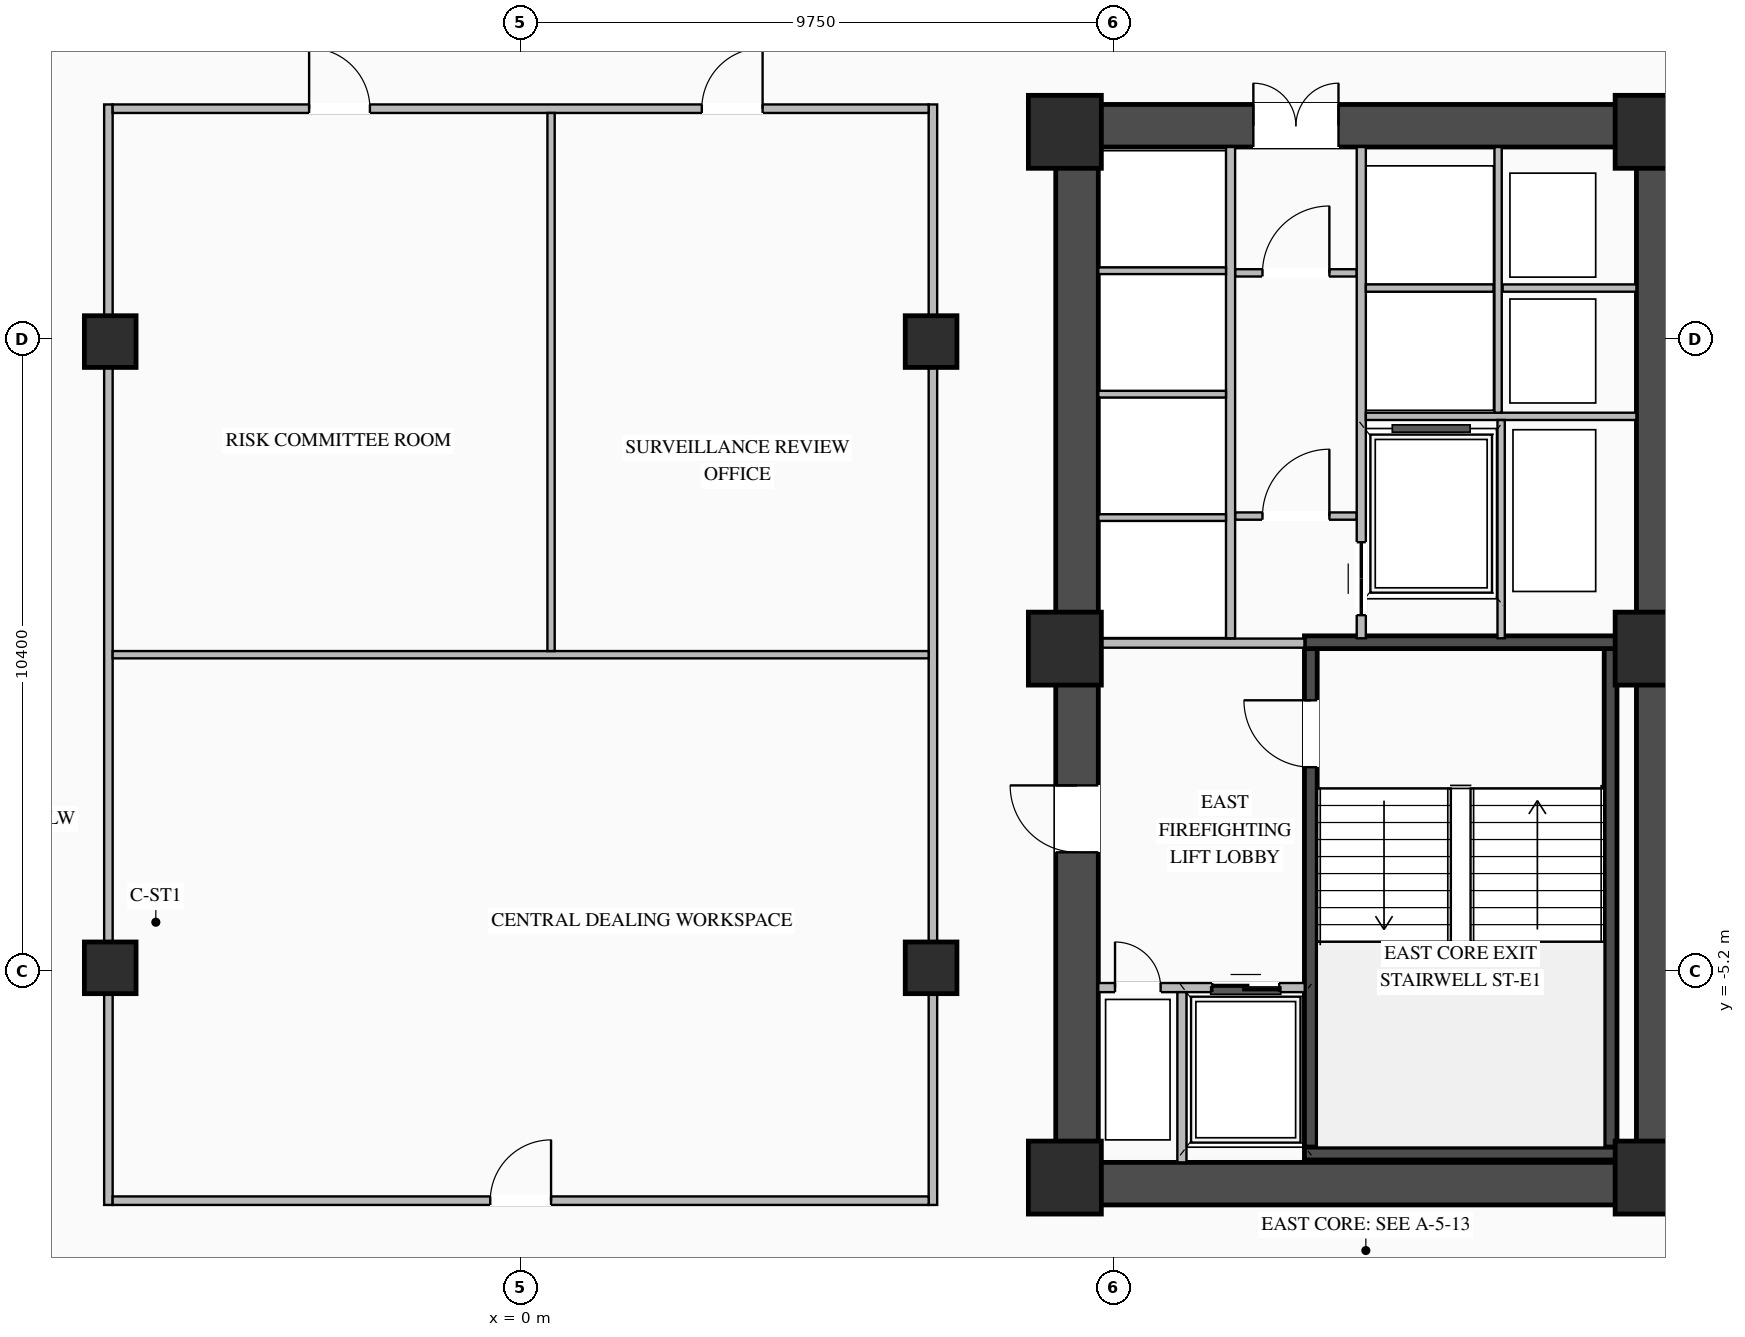
"""IFC4 building model, lengths in metres.
Left out: names, types, materials, properties, quantities, classifications, styles, units other than length and angle.
Written with IfcOpenShell. Run it as: python <this file> out.ifc"""

import sys

from ifc_helpers import new_model, si_unit, direction, frame, frame_2d, origin, origin_2d, place, context, subcontext, project, spatial, rectangle, i_section, extrude, element, fill, save


model = new_model("IFC4")
c1 = context("Model", 3, precision=1e-05, world=origin(), true_north=direction((0.0, 1.0)))
c2 = subcontext(c1, "Body", "Model", "MODEL_VIEW")
j1 = project(units=[si_unit("LENGTHUNIT", "METRE"), si_unit("PLANEANGLEUNIT", "RADIAN")], contexts=[c1])
p1 = place(None, origin())
s1 = spatial("IfcSite", under=j1, at=p1, CompositionType="ELEMENT")
p2 = place(p1, origin())
s2 = spatial("IfcBuilding", under=s1, at=p2, CompositionType="ELEMENT")
p3 = place(p2, frame((0.0, 0.0, 51.9)))
s3 = spatial("IfcBuildingStorey", under=s2, at=p3, CompositionType="ELEMENT", Elevation=51.9)
p4 = place(p3, frame((8.8, -8.7, 0.0), z_axis=(0.0, 0.0, 1.0), x_axis=(1.0, 0.0, 0.0)))
e1 = element("IfcWall", 1, at=p4, inside=s3, PredefinedType="SHEAR", context=c2, shape_type="SweptSolid", body=[
    extrude(rectangle(XDim=10.25, YDim=0.7, at=frame_2d((5.125, 0.0))), origin(), (0.0, 0.0, 1.0), 3.27),
])
p5 = place(p3, frame((8.8, 8.7, 0.0), z_axis=(0.0, 0.0, 1.0), x_axis=(1.0, 0.0, 0.0)))
e2 = element("IfcWall", 2, at=p5, inside=s3, PredefinedType="SHEAR", context=c2, shape_type="SweptSolid", body=[
    extrude(rectangle(XDim=10.25, YDim=0.7, at=frame_2d((5.125, 0.0))), origin(), (0.0, 0.0, 1.0), 3.27),
])
p6 = place(p5, frame((3.25, 0.0, 0.0)))
e3 = element("IfcOpeningElement", 3, at=p6, cuts=e2, PredefinedType="OPENING", context=c2, shape_type="SweptSolid", body=[
    extrude(rectangle(XDim=1.4, YDim=2.05, at=frame_2d((0.7, 1.025))), frame((0.0, 0.36, 0.0), z_axis=(0.0, -1.0, 0.0), x_axis=(1.0, 0.0, 0.0)), (0.0, 0.0, 1.0), 0.72),
])
p7 = place(p3, frame((9.15, -8.35, 0.0), z_axis=(0.0, 0.0, 1.0), x_axis=(0.0, 1.0, 0.0)))
e4 = element("IfcWall", 4, at=p7, inside=s3, PredefinedType="SHEAR", context=c2, shape_type="SweptSolid", body=[
    extrude(rectangle(XDim=16.7, YDim=0.7, at=frame_2d((8.35, 0.0))), origin(), (0.0, 0.0, 1.0), 3.27),
])
p8 = place(p7, frame((5.1, 0.0, 0.0)))
e5 = element("IfcOpeningElement", 5, at=p8, cuts=e4, PredefinedType="OPENING", context=c2, shape_type="SweptSolid", body=[
    extrude(rectangle(XDim=1.1, YDim=2.08, at=frame_2d((0.55, 1.04))), frame((0.0, 0.36, 0.0), z_axis=(0.0, -1.0, 0.0), x_axis=(1.0, 0.0, 0.0)), (0.0, 0.0, 1.0), 0.72),
])
p9 = place(p3, frame((18.7, -8.35, 0.0), z_axis=(0.0, 0.0, 1.0), x_axis=(0.0, 1.0, 0.0)))
e6 = element("IfcWall", 6, at=p9, inside=s3, PredefinedType="SHEAR", context=c2, shape_type="SweptSolid", body=[
    extrude(rectangle(XDim=16.7, YDim=0.7, at=frame_2d((8.35, 0.0))), origin(), (0.0, 0.0, 1.0), 3.27),
])
p10 = place(p3, frame((12.995, -8.1, 0.0), z_axis=(0.0, 0.0, 1.0), x_axis=(0.0, 1.0, 0.0)))
e7 = element("IfcWall", 7, at=p10, inside=s3, PredefinedType="SHEAR", context=c2, shape_type="SweptSolid", body=[
    extrude(rectangle(XDim=8.2, YDim=0.21, at=frame_2d((4.1, 0.0))), origin(), (0.0, 0.0, 1.0), 3.27),
])
p11 = place(p10, frame((6.25, 0.0, 0.0)))
e8 = element("IfcOpeningElement", 8, at=p11, cuts=e7, PredefinedType="OPENING", context=c2, shape_type="SweptSolid", body=[
    extrude(rectangle(XDim=1.1, YDim=2.15, at=frame_2d((0.55, 1.075))), frame((0.0, 0.115, 0.0), z_axis=(0.0, -1.0, 0.0), x_axis=(1.0, 0.0, 0.0)), (0.0, 0.0, 1.0), 0.23),
])
p12 = place(p3, frame((17.925, -8.1, 0.0), z_axis=(0.0, 0.0, 1.0), x_axis=(0.0, 1.0, 0.0)))
e9 = element("IfcWall", 9, at=p12, inside=s3, PredefinedType="SHEAR", context=c2, shape_type="SweptSolid", body=[
    extrude(rectangle(XDim=8.2, YDim=0.21, at=frame_2d((4.1, 0.0))), origin(), (0.0, 0.0, 1.0), 3.27),
])
for number, where, z_axis, x_axis in (
    (10, (12.89, -8.205, 0.0), (0.0, 0.0, 1.0), (1.0, 0.0, 0.0)),
    (11, (18.03, 0.205, 0.0), (0.0, 0.0, 1.0), (-1.0, 0.0, 0.0)),
):
    element("IfcWall", number, at=place(p3, frame(where, z_axis=z_axis, x_axis=x_axis)), inside=s3, PredefinedType="SHEAR", context=c2, shape_type="SweptSolid", body=[
        extrude(rectangle(XDim=5.14, YDim=0.21, at=frame_2d((2.57, 0.0))), origin(), (0.0, 0.0, 1.0), 3.27),
    ])
for number, where, z_axis, x_axis in (
    (12, (8.95, -8.6, 0.0), (0.0, 0.0, 1.0), (1.0, 0.0, 0.0)),
    (13, (8.95, 0.1, 0.0), (0.0, 0.0, 1.0), (1.0, 0.0, 0.0)),
    (14, (8.95, 8.6, 0.0), (0.0, 0.0, 1.0), (1.0, 0.0, 0.0)),
    (15, (18.6, -8.6, 0.0), (0.0, 0.0, 1.0), (1.0, 0.0, 0.0)),
    (16, (18.6, 0.1, 0.0), (0.0, 0.0, 1.0), (1.0, 0.0, 0.0)),
    (17, (18.6, 8.6, 0.0), (0.0, 0.0, 1.0), (1.0, 0.0, 0.0)),
):
    element("IfcColumn", number, at=place(p3, frame(where, z_axis=z_axis, x_axis=x_axis)), inside=s3, PredefinedType="COLUMN", context=c2, shape_type="SweptSolid", body=[
        extrude(rectangle(XDim=1.2, YDim=1.2, at=origin_2d()), origin(), (0.0, 0.0, 1.0), 3.45),
    ])
for number, where, z_axis, x_axis in (
    (18, (-6.75, -5.15, 0.0), (0.0, 0.0, 1.0), (1.0, 0.0, 0.0)),
    (19, (-6.75, 5.15, 0.0), (0.0, 0.0, 1.0), (1.0, 0.0, 0.0)),
    (20, (6.75, -5.15, 0.0), (0.0, 0.0, 1.0), (1.0, 0.0, 0.0)),
    (21, (6.75, 5.15, 0.0), (0.0, 0.0, 1.0), (1.0, 0.0, 0.0)),
):
    element("IfcColumn", number, at=place(p3, frame(where, z_axis=z_axis, x_axis=x_axis)), inside=s3, PredefinedType="COLUMN", context=c2, shape_type="SweptSolid", body=[
        extrude(i_section(OverallWidth=0.85, OverallDepth=0.85, WebThickness=0.032, FlangeThickness=0.048, at=origin_2d()), origin(), (0.0, 0.0, 1.0), 3.45),
    ])
p13 = place(p3, frame((9.5, -5.475, 0.0), z_axis=(0.0, 0.0, 1.0), x_axis=(1.0, 0.0, 0.0)))
e22 = element("IfcWall", 22, at=p13, inside=s3, PredefinedType="STANDARD", context=c2, shape_type="SweptSolid", body=[
    extrude(rectangle(XDim=3.395, YDim=0.15, at=frame_2d((1.698, 0.0))), origin(), (0.0, 0.0, 1.0), 3.25),
])
p14 = place(p13, frame((1.875, 0.0, 0.0)))
e23 = element("IfcOpeningElement", 23, at=p14, cuts=e22, PredefinedType="OPENING", context=c2, shape_type="SweptSolid", body=[
    extrude(rectangle(XDim=1.1, YDim=2.15, at=frame_2d((0.55, 1.075))), frame((0.0, 0.085, 0.0), z_axis=(0.0, -1.0, 0.0), x_axis=(1.0, 0.0, 0.0)), (0.0, 0.0, 1.0), 0.17),
])
p15 = place(p13, frame((0.275, 0.0, 0.0)))
e24 = element("IfcOpeningElement", 24, at=p15, cuts=e22, PredefinedType="OPENING", context=c2, shape_type="SweptSolid", body=[
    extrude(rectangle(XDim=0.75, YDim=2.05, at=frame_2d((0.375, 1.025))), frame((0.0, 0.085, 0.0), z_axis=(0.0, -1.0, 0.0), x_axis=(1.0, 0.0, 0.0)), (0.0, 0.0, 1.0), 0.17),
])
p16 = place(p3, frame((10.875, -8.35, 0.0), z_axis=(0.0, 0.0, 1.0), x_axis=(0.0, 1.0, 0.0)))
e25 = element("IfcWall", 25, at=p16, inside=s3, PredefinedType="STANDARD", context=c2, shape_type="SweptSolid", body=[
    extrude(rectangle(XDim=2.8, YDim=0.15, at=frame_2d((1.4, 0.0))), origin(), (0.0, 0.0, 1.0), 3.25),
])
p17 = place(p3, frame((9.5, 0.19, 0.0), z_axis=(0.0, 0.0, 1.0), x_axis=(1.0, 0.0, 0.0)))
e26 = element("IfcWall", 26, at=p17, inside=s3, PredefinedType="STANDARD", context=c2, shape_type="SweptSolid", body=[
    extrude(rectangle(XDim=3.39, YDim=0.15, at=frame_2d((1.695, 0.0))), origin(), (0.0, 0.0, 1.0), 2.645),
])
p18 = place(p3, frame((11.75, 2.28, 0.0), z_axis=(0.0, 0.0, 1.0), x_axis=(1.0, 0.0, 0.0)))
e27 = element("IfcWall", 27, at=p18, inside=s3, PredefinedType="STANDARD", context=c2, shape_type="SweptSolid", body=[
    extrude(rectangle(XDim=2.0, YDim=0.12, at=frame_2d((1.0, 0.0))), origin(), (0.0, 0.0, 1.0), 3.25),
])
p19 = place(p18, frame((0.45, 0.0, 0.0)))
e28 = element("IfcOpeningElement", 28, at=p19, cuts=e27, PredefinedType="OPENING", context=c2, shape_type="SweptSolid", body=[
    extrude(rectangle(XDim=1.1, YDim=2.1, at=frame_2d((0.55, 1.05))), frame((0.0, 0.07, 0.0), z_axis=(0.0, -1.0, 0.0), x_axis=(1.0, 0.0, 0.0)), (0.0, 0.0, 1.0), 0.14),
])
p20 = place(p3, frame((11.75, 6.28, 0.0), z_axis=(0.0, 0.0, 1.0), x_axis=(1.0, 0.0, 0.0)))
e29 = element("IfcWall", 29, at=p20, inside=s3, PredefinedType="STANDARD", context=c2, shape_type="SweptSolid", body=[
    extrude(rectangle(XDim=2.0, YDim=0.12, at=frame_2d((1.0, 0.0))), origin(), (0.0, 0.0, 1.0), 3.25),
])
p21 = place(p20, frame((0.45, 0.0, 0.0)))
e30 = element("IfcOpeningElement", 30, at=p21, cuts=e29, PredefinedType="OPENING", context=c2, shape_type="SweptSolid", body=[
    extrude(rectangle(XDim=1.1, YDim=2.1, at=frame_2d((0.55, 1.05))), frame((0.0, 0.07, 0.0), z_axis=(0.0, -1.0, 0.0), x_axis=(1.0, 0.0, 0.0)), (0.0, 0.0, 1.0), 0.14),
])
p22 = place(p3, frame((11.675, 0.27, 0.0), z_axis=(0.0, 0.0, 1.0), x_axis=(0.0, 1.0, 0.0)))
e31 = element("IfcWall", 31, at=p22, inside=s3, PredefinedType="STANDARD", context=c2, shape_type="SweptSolid", body=[
    extrude(rectangle(XDim=8.08, YDim=0.15, at=frame_2d((4.04, 0.0))), origin(), (0.0, 0.0, 1.0), 3.25),
])
for number, where, z_axis, x_axis in (
    (32, (9.5, 2.255, 0.0), (0.0, 0.0, 1.0), (1.0, 0.0, 0.0)),
    (33, (9.5, 4.285, 0.0), (0.0, 0.0, 1.0), (1.0, 0.0, 0.0)),
    (34, (9.5, 6.315, 0.0), (0.0, 0.0, 1.0), (1.0, 0.0, 0.0)),
):
    element("IfcWall", number, at=place(p3, frame(where, z_axis=z_axis, x_axis=x_axis)), inside=s3, PredefinedType="STANDARD", context=c2, shape_type="SweptSolid", body=[
        extrude(rectangle(XDim=2.1, YDim=0.11, at=frame_2d((1.05, 0.0))), origin(), (0.0, 0.0, 1.0), 3.25),
    ])
p23 = place(p3, frame((13.825, 0.27, 0.0), z_axis=(0.0, 0.0, 1.0), x_axis=(0.0, 1.0, 0.0)))
e35 = element("IfcWall", 35, at=p23, inside=s3, PredefinedType="STANDARD", context=c2, shape_type="SweptSolid", body=[
    extrude(rectangle(XDim=8.08, YDim=0.15, at=frame_2d((4.04, 0.0))), origin(), (0.0, 0.0, 1.0), 3.25),
])
p24 = place(p23, frame((0.38, 0.0, 0.0)))
e36 = element("IfcOpeningElement", 36, at=p24, cuts=e35, PredefinedType="OPENING", context=c2, shape_type="SweptSolid", body=[
    extrude(rectangle(XDim=1.2, YDim=2.1, at=frame_2d((0.6, 1.05))), frame((0.0, 0.085, 0.0), z_axis=(0.0, -1.0, 0.0), x_axis=(1.0, 0.0, 0.0)), (0.0, 0.0, 1.0), 0.17),
])
p25 = place(p3, frame((13.9, 3.92, 0.0), z_axis=(0.0, 0.0, 1.0), x_axis=(1.0, 0.0, 0.0)))
e37 = element("IfcWall", 37, at=p25, inside=s3, PredefinedType="STANDARD", context=c2, shape_type="SweptSolid", body=[
    extrude(rectangle(XDim=4.45, YDim=0.12, at=frame_2d((2.225, 0.0))), origin(), (0.0, 0.0, 1.0), 3.25),
])
p26 = place(p3, frame((16.15, 6.03, 0.0), z_axis=(0.0, 0.0, 1.0), x_axis=(1.0, 0.0, 0.0)))
e38 = element("IfcWall", 38, at=p26, inside=s3, PredefinedType="STANDARD", context=c2, shape_type="SweptSolid", body=[
    extrude(rectangle(XDim=2.2, YDim=0.12, at=frame_2d((1.1, 0.0))), origin(), (0.0, 0.0, 1.0), 3.25),
])
p27 = place(p3, frame((16.075, 3.98, 0.0), z_axis=(0.0, 0.0, 1.0), x_axis=(0.0, 1.0, 0.0)))
e39 = element("IfcWall", 39, at=p27, inside=s3, PredefinedType="STANDARD", context=c2, shape_type="SweptSolid", body=[
    extrude(rectangle(XDim=4.37, YDim=0.12, at=frame_2d((2.185, 0.0))), origin(), (0.0, 0.0, 1.0), 3.25),
])
p28 = place(p3, frame((13.9, 6.03, 0.0), z_axis=(0.0, 0.0, 1.0), x_axis=(1.0, 0.0, 0.0)))
e40 = element("IfcWall", 40, at=p28, inside=s3, PredefinedType="STANDARD", context=c2, shape_type="SweptSolid", body=[
    extrude(rectangle(XDim=2.1, YDim=0.12, at=frame_2d((1.05, 0.0))), origin(), (0.0, 0.0, 1.0), 3.25),
])
p29 = place(p3, frame((16.125, 0.27, 0.0), z_axis=(0.0, 0.0, 1.0), x_axis=(0.0, 1.0, 0.0)))
e41 = element("IfcWall", 41, at=p29, inside=s3, PredefinedType="STANDARD", context=c2, shape_type="SweptSolid", body=[
    extrude(rectangle(XDim=3.59, YDim=0.12, at=frame_2d((1.795, 0.0))), origin(), (0.0, 0.0, 1.0), 3.25),
])
for number, where, z_axis, x_axis in (
    (42, (-6.78, -9.05, 0.0), (0.0, 0.0, 1.0), (0.0, 1.0, 0.0)),
    (43, (6.78, -9.05, 0.0), (0.0, 0.0, 1.0), (0.0, 1.0, 0.0)),
):
    element("IfcWall", number, at=place(p3, frame(where, z_axis=z_axis, x_axis=x_axis)), inside=s3, PredefinedType="STANDARD", context=c2, shape_type="SweptSolid", body=[
        extrude(rectangle(XDim=18.1, YDim=0.14, at=frame_2d((9.05, 0.0))), origin(), (0.0, 0.0, 1.0), 2.645),
    ])
p30 = place(p3, frame((-6.71, -8.98, 0.0), z_axis=(0.0, 0.0, 1.0), x_axis=(1.0, 0.0, 0.0)))
e44 = element("IfcWall", 44, at=p30, inside=s3, PredefinedType="STANDARD", context=c2, shape_type="SweptSolid", body=[
    extrude(rectangle(XDim=13.42, YDim=0.14, at=frame_2d((6.71, 0.0))), origin(), (0.0, 0.0, 1.0), 3.25),
])
p31 = place(p30, frame((6.21, 0.0, 0.0)))
e45 = element("IfcOpeningElement", 45, at=p31, cuts=e44, PredefinedType="OPENING", context=c2, shape_type="SweptSolid", body=[
    extrude(rectangle(XDim=1.0, YDim=2.08, at=frame_2d((0.5, 1.04))), frame((0.0, 0.08, 0.0), z_axis=(0.0, -1.0, 0.0), x_axis=(1.0, 0.0, 0.0)), (0.0, 0.0, 1.0), 0.16),
])
p32 = place(p3, frame((-6.71, 8.98, 0.0), z_axis=(0.0, 0.0, 1.0), x_axis=(1.0, 0.0, 0.0)))
e46 = element("IfcWall", 46, at=p32, inside=s3, PredefinedType="STANDARD", context=c2, shape_type="SweptSolid", body=[
    extrude(rectangle(XDim=13.42, YDim=0.14, at=frame_2d((6.71, 0.0))), origin(), (0.0, 0.0, 1.0), 3.25),
])
p33 = place(p32, frame((3.231, 0.0, 0.0)))
e47 = element("IfcOpeningElement", 47, at=p33, cuts=e46, PredefinedType="OPENING", context=c2, shape_type="SweptSolid", body=[
    extrude(rectangle(XDim=1.0, YDim=2.08, at=frame_2d((0.5, 1.04))), frame((0.0, 0.08, 0.0), z_axis=(0.0, -1.0, 0.0), x_axis=(1.0, 0.0, 0.0)), (0.0, 0.0, 1.0), 0.16),
])
p34 = place(p32, frame((9.689, 0.0, 0.0)))
e48 = element("IfcOpeningElement", 48, at=p34, cuts=e46, PredefinedType="OPENING", context=c2, shape_type="SweptSolid", body=[
    extrude(rectangle(XDim=1.0, YDim=2.08, at=frame_2d((0.5, 1.04))), frame((0.0, 0.08, 0.0), z_axis=(0.0, -1.0, 0.0), x_axis=(1.0, 0.0, 0.0)), (0.0, 0.0, 1.0), 0.16),
])
p35 = place(p3, frame((-6.71, 0.0, 0.0), z_axis=(0.0, 0.0, 1.0), x_axis=(1.0, 0.0, 0.0)))
e49 = element("IfcWall", 49, at=p35, inside=s3, PredefinedType="STANDARD", context=c2, shape_type="SweptSolid", body=[
    extrude(rectangle(XDim=13.42, YDim=0.12, at=frame_2d((6.71, 0.0))), origin(), (0.0, 0.0, 1.0), 3.25),
])
p36 = place(p3, frame((0.5, 0.06, 0.0), z_axis=(0.0, 0.0, 1.0), x_axis=(0.0, 1.0, 0.0)))
e50 = element("IfcWall", 50, at=p36, inside=s3, PredefinedType="STANDARD", context=c2, shape_type="SweptSolid", body=[
    extrude(rectangle(XDim=8.85, YDim=0.12, at=frame_2d((4.425, 0.0))), origin(), (0.0, 0.0, 1.0), 3.25),
])
p37 = place(p11, origin())
e51 = element("IfcDoor", 51, at=p37, inside=s3, OperationType="SINGLE_SWING_RIGHT", PredefinedType="DOOR", context=c2, shape_type="SweptSolid", body=[
    extrude(rectangle(XDim=1.1, YDim=2.15, at=frame_2d((0.55, 1.075))), frame((0.0, 0.025, 0.0), z_axis=(0.0, -1.0, 0.0), x_axis=(1.0, 0.0, 0.0)), (0.0, 0.0, 1.0), 0.05),
])
fill(e8, e51)
p38 = place(p14, origin())
e52 = element("IfcDoor", 52, at=p38, inside=s3, OperationType="DOUBLE_DOOR_SLIDING", PredefinedType="DOOR", context=c2, shape_type="SweptSolid", body=[
    extrude(rectangle(XDim=1.1, YDim=2.15, at=frame_2d((0.55, 1.075))), frame((0.0, 0.025, 0.0), z_axis=(0.0, -1.0, 0.0), x_axis=(1.0, 0.0, 0.0)), (0.0, 0.0, 1.0), 0.05),
])
fill(e23, e52)
p39 = place(p15, origin())
e53 = element("IfcDoor", 53, at=p39, inside=s3, OperationType="SINGLE_SWING_LEFT", PredefinedType="DOOR", context=c2, shape_type="SweptSolid", body=[
    extrude(rectangle(XDim=0.75, YDim=2.05, at=frame_2d((0.375, 1.025))), frame((0.0, 0.025, 0.0), z_axis=(0.0, -1.0, 0.0), x_axis=(1.0, 0.0, 0.0)), (0.0, 0.0, 1.0), 0.05),
])
fill(e24, e53)
p40 = place(p8, origin())
e54 = element("IfcDoor", 54, at=p40, inside=s3, OperationType="SINGLE_SWING_RIGHT", PredefinedType="DOOR", context=c2, shape_type="SweptSolid", body=[
    extrude(rectangle(XDim=1.1, YDim=2.08, at=frame_2d((0.55, 1.04))), frame((0.0, -0.255, 0.0), z_axis=(0.0, -1.0, 0.0), x_axis=(1.0, 0.0, 0.0)), (0.0, 0.0, 1.0), 0.05),
])
fill(e5, e54)
p41 = place(p19, origin())
e55 = element("IfcDoor", 55, at=p41, inside=s3, OperationType="SINGLE_SWING_RIGHT", PredefinedType="DOOR", context=c2, shape_type="SweptSolid", body=[
    extrude(rectangle(XDim=1.1, YDim=2.1, at=frame_2d((0.55, 1.05))), frame((0.0, 0.025, 0.0), z_axis=(0.0, -1.0, 0.0), x_axis=(1.0, 0.0, 0.0)), (0.0, 0.0, 1.0), 0.05),
])
fill(e28, e55)
p42 = place(p21, origin())
e56 = element("IfcDoor", 56, at=p42, inside=s3, OperationType="SINGLE_SWING_RIGHT", PredefinedType="DOOR", context=c2, shape_type="SweptSolid", body=[
    extrude(rectangle(XDim=1.1, YDim=2.1, at=frame_2d((0.55, 1.05))), frame((0.0, 0.025, 0.0), z_axis=(0.0, -1.0, 0.0), x_axis=(1.0, 0.0, 0.0)), (0.0, 0.0, 1.0), 0.05),
])
fill(e30, e56)
p43 = place(p6, origin())
e57 = element("IfcDoor", 57, at=p43, inside=s3, OperationType="DOUBLE_DOOR_SINGLE_SWING", PredefinedType="DOOR", context=c2, shape_type="SweptSolid", body=[
    extrude(rectangle(XDim=1.4, YDim=2.05, at=frame_2d((0.7, 1.025))), frame((0.0, 0.295, 0.0), z_axis=(0.0, -1.0, 0.0), x_axis=(1.0, 0.0, 0.0)), (0.0, 0.0, 1.0), 0.05),
])
fill(e3, e57)
p44 = place(p24, origin())
e58 = element("IfcDoor", 58, at=p44, inside=s3, OperationType="DOUBLE_DOOR_SLIDING", PredefinedType="DOOR", context=c2, shape_type="SweptSolid", body=[
    extrude(rectangle(XDim=1.2, YDim=2.1, at=frame_2d((0.6, 1.05))), frame((0.0, 0.025, 0.0), z_axis=(0.0, -1.0, 0.0), x_axis=(1.0, 0.0, 0.0)), (0.0, 0.0, 1.0), 0.05),
])
fill(e36, e58)
p45 = place(p31, origin())
e59 = element("IfcDoor", 59, at=p45, inside=s3, OperationType="SINGLE_SWING_RIGHT", PredefinedType="DOOR", context=c2, shape_type="SweptSolid", body=[
    extrude(rectangle(XDim=1.0, YDim=2.08, at=frame_2d((0.5, 1.04))), frame((0.0, 0.025, 0.0), z_axis=(0.0, -1.0, 0.0), x_axis=(1.0, 0.0, 0.0)), (0.0, 0.0, 1.0), 0.05),
])
fill(e45, e59)
p46 = place(p33, origin())
e60 = element("IfcDoor", 60, at=p46, inside=s3, OperationType="SINGLE_SWING_LEFT", PredefinedType="DOOR", context=c2, shape_type="SweptSolid", body=[
    extrude(rectangle(XDim=1.0, YDim=2.08, at=frame_2d((0.5, 1.04))), frame((0.0, 0.025, 0.0), z_axis=(0.0, -1.0, 0.0), x_axis=(1.0, 0.0, 0.0)), (0.0, 0.0, 1.0), 0.05),
])
fill(e47, e60)
p47 = place(p34, origin())
e61 = element("IfcDoor", 61, at=p47, inside=s3, OperationType="SINGLE_SWING_RIGHT", PredefinedType="DOOR", context=c2, shape_type="SweptSolid", body=[
    extrude(rectangle(XDim=1.0, YDim=2.08, at=frame_2d((0.5, 1.04))), frame((0.0, 0.025, 0.0), z_axis=(0.0, -1.0, 0.0), x_axis=(1.0, 0.0, 0.0)), (0.0, 0.0, 1.0), 0.05),
])
fill(e48, e61)
save(model, sys.argv[1])
